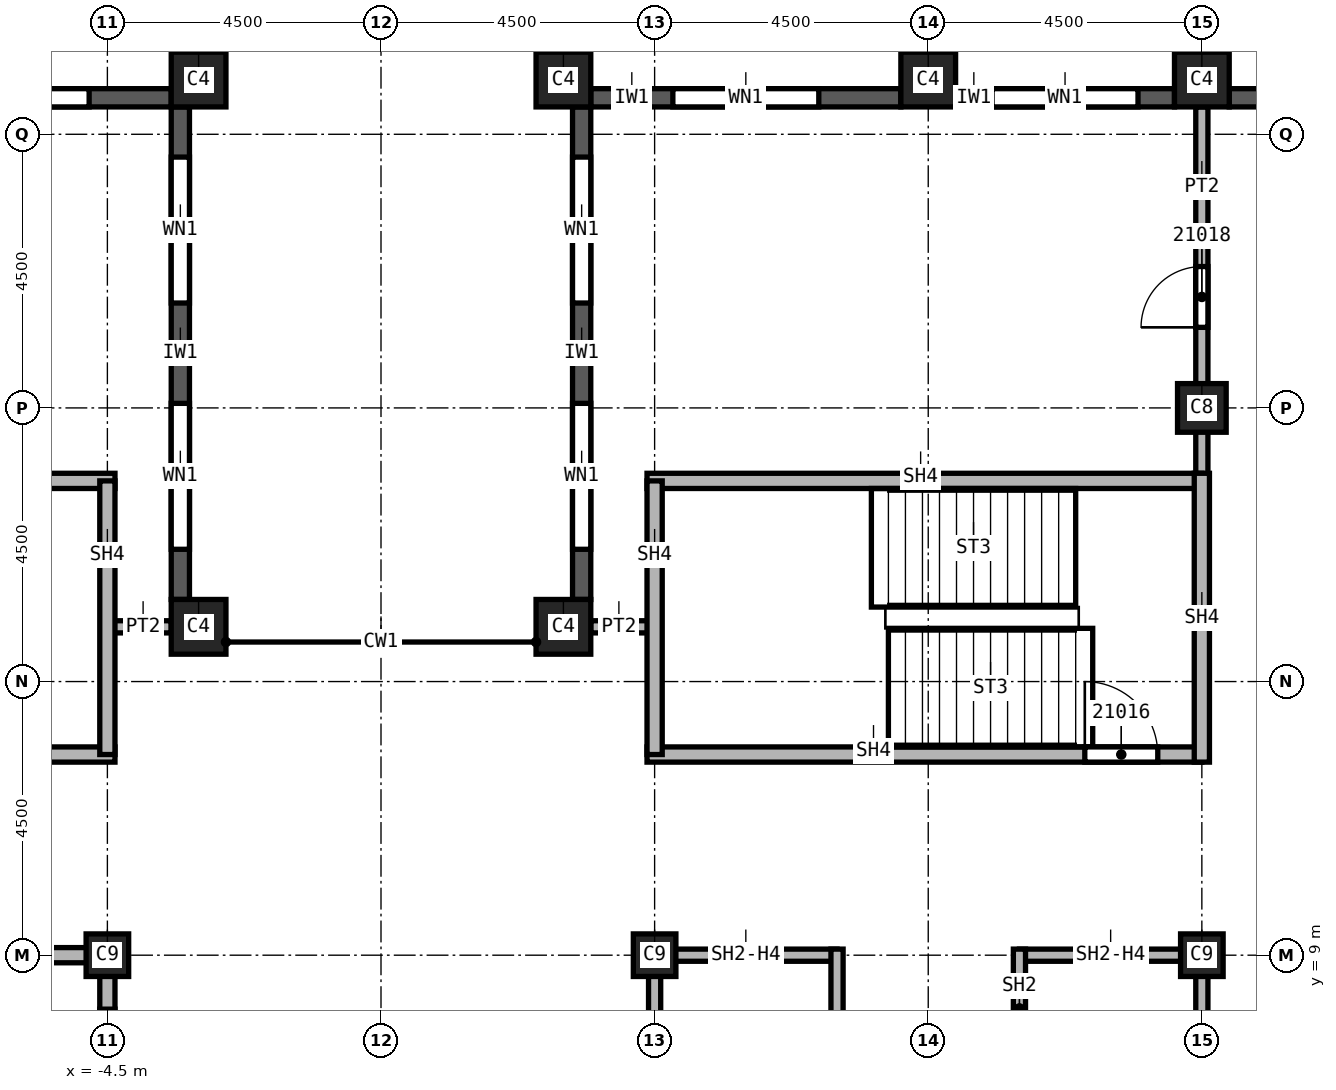
"""IFC4 building model, lengths in metres.
Left out: names, types, materials, properties, quantities, classifications, styles, units other than length and angle.
Written with IfcOpenShell. Run it as: python <this file> out.ifc"""

import sys

from ifc_helpers import new_model, si_unit, direction, frame, frame_2d, origin, origin_2d, place, context, subcontext, project, spatial, rectangle, extrude, element, fill, save


model = new_model("IFC4")
c1 = context("Model", 3, precision=1e-05, world=origin(), true_north=direction((0.0, 1.0)))
c2 = subcontext(c1, "Body", "Model", "MODEL_VIEW")
j1 = project(units=[si_unit("LENGTHUNIT", "METRE"), si_unit("PLANEANGLEUNIT", "RADIAN")], contexts=[c1])
p1 = place(None, origin())
s1 = spatial("IfcSite", under=j1, at=p1, CompositionType="ELEMENT")
p2 = place(p1, origin())
s2 = spatial("IfcBuilding", under=s1, at=p2, CompositionType="ELEMENT")
p3 = place(p2, frame((0.0, 0.0, 304.0)))
s3 = spatial("IfcBuildingStorey", under=s2, at=p3, CompositionType="ELEMENT", Elevation=304.0)
p4 = place(p3, frame((13.5, 18.0, 0.0), z_axis=(0.0, 0.0, 1.0), x_axis=(1.0, 0.0, 0.0)))
e1 = element("IfcColumn", 1, at=p4, inside=s3, PredefinedType="COLUMN", context=c2, shape_type="SweptSolid", body=[
    extrude(rectangle(XDim=0.8, YDim=0.8, at=origin_2d()), origin(), (0.0, 0.0, 1.0), 3.74),
])
for number, where, z_axis, x_axis in (
    (2, (4.5, 9.0, 0.0), (0.0, 0.0, 1.0), (1.0, 0.0, 0.0)),
    (3, (13.5, 9.0, 0.0), (0.0, 0.0, 1.0), (1.0, 0.0, 0.0)),
    (4, (-4.5, 9.0, 0.0), (0.0, 0.0, 1.0), (1.0, 0.0, 0.0)),
):
    element("IfcColumn", number, at=place(p3, frame(where, z_axis=z_axis, x_axis=x_axis)), inside=s3, PredefinedType="COLUMN", context=c2, shape_type="SweptSolid", body=[
        extrude(rectangle(XDim=0.7, YDim=0.7, at=origin_2d()), origin(), (0.0, 0.0, 1.0), 3.74),
    ])
for number, where, z_axis, x_axis in (
    (5, (3.0, 23.4, 0.0), (0.0, 0.0, 1.0), (1.0, 0.0, 0.0)),
    (6, (9.0, 23.4, 0.0), (0.0, 0.0, 1.0), (1.0, 0.0, 0.0)),
    (7, (13.5, 23.4, 0.0), (0.0, 0.0, 1.0), (1.0, 0.0, 0.0)),
    (8, (-3.0, 23.4, 0.0), (0.0, 0.0, 1.0), (1.0, 0.0, 0.0)),
    (9, (3.0, 14.4, 0.0), (0.0, 0.0, 1.0), (1.0, 0.0, 0.0)),
    (10, (-3.0, 14.4, 0.0), (0.0, 0.0, 1.0), (1.0, 0.0, 0.0)),
):
    element("IfcColumn", number, at=place(p3, frame(where, z_axis=z_axis, x_axis=x_axis)), inside=s3, PredefinedType="COLUMN", context=c2, shape_type="SweptSolid", body=[
        extrude(rectangle(XDim=0.9, YDim=0.9, at=origin_2d()), origin(), (0.0, 0.0, 1.0), 3.74),
    ])
p5 = place(p3, frame((17.55, 23.1, 0.0), z_axis=(0.0, 0.0, 1.0), x_axis=(-1.0, 0.0, 0.0)))
e11 = element("IfcWall", 11, at=p5, inside=s3, PredefinedType="SOLIDWALL", context=c2, shape_type="SweptSolid", body=[
    extrude(rectangle(XDim=3.6, YDim=0.3, at=frame_2d((1.8, 0.0))), origin(), (0.0, 0.0, 1.0), 3.14),
])
p6 = place(p5, frame((0.775, 0.0, 0.8)))
e12 = element("IfcOpeningElement", 12, at=p6, cuts=e11, PredefinedType="OPENING", context=c2, shape_type="SweptSolid", body=[
    extrude(rectangle(XDim=1.0, YDim=1.95, at=frame_2d((0.5, 0.975))), frame((0.0, 0.15, 0.0), z_axis=(0.0, -1.0, 0.0), x_axis=(1.0, 0.0, 0.0)), (0.0, 0.0, 1.0), 0.3),
])
p7 = place(p5, frame((2.375, 0.0, 0.8)))
e13 = element("IfcOpeningElement", 13, at=p7, cuts=e11, PredefinedType="OPENING", context=c2, shape_type="SweptSolid", body=[
    extrude(rectangle(XDim=0.6, YDim=1.95, at=frame_2d((0.3, 0.975))), frame((0.0, 0.15, 0.0), z_axis=(0.0, -1.0, 0.0), x_axis=(1.0, 0.0, 0.0)), (0.0, 0.0, 1.0), 0.3),
])
p8 = place(p3, frame((13.05, 23.1, 0.0), z_axis=(0.0, 0.0, 1.0), x_axis=(-1.0, 0.0, 0.0)))
e14 = element("IfcWall", 14, at=p8, inside=s3, PredefinedType="SOLIDWALL", context=c2, shape_type="SweptSolid", body=[
    extrude(rectangle(XDim=3.6, YDim=0.3, at=frame_2d((1.8, 0.0))), origin(), (0.0, 0.0, 1.0), 3.14),
])
p9 = place(p8, frame((0.6, 0.0, 0.8)))
e15 = element("IfcOpeningElement", 15, at=p9, cuts=e14, PredefinedType="OPENING", context=c2, shape_type="SweptSolid", body=[
    extrude(rectangle(XDim=2.4, YDim=1.95, at=frame_2d((1.2, 0.975))), frame((0.0, 0.15, 0.0), z_axis=(0.0, -1.0, 0.0), x_axis=(1.0, 0.0, 0.0)), (0.0, 0.0, 1.0), 0.3),
])
p10 = place(p3, frame((8.55, 23.1, 0.0), z_axis=(0.0, 0.0, 1.0), x_axis=(-1.0, 0.0, 0.0)))
e16 = element("IfcWall", 16, at=p10, inside=s3, PredefinedType="SOLIDWALL", context=c2, shape_type="SweptSolid", body=[
    extrude(rectangle(XDim=5.1, YDim=0.3, at=frame_2d((2.55, 0.0))), origin(), (0.0, 0.0, 1.0), 3.14),
])
p11 = place(p10, frame((1.35, 0.0, 0.8)))
e17 = element("IfcOpeningElement", 17, at=p11, cuts=e16, PredefinedType="OPENING", context=c2, shape_type="SweptSolid", body=[
    extrude(rectangle(XDim=2.4, YDim=1.95, at=frame_2d((1.2, 0.975))), frame((0.0, 0.15, 0.0), z_axis=(0.0, -1.0, 0.0), x_axis=(1.0, 0.0, 0.0)), (0.0, 0.0, 1.0), 0.3),
])
p12 = place(p3, frame((3.3, 22.95, 0.0), z_axis=(0.0, 0.0, 1.0), x_axis=(0.0, -1.0, 0.0)))
e18 = element("IfcWall", 18, at=p12, inside=s3, PredefinedType="SOLIDWALL", context=c2, shape_type="SweptSolid", body=[
    extrude(rectangle(XDim=8.1, YDim=0.3, at=frame_2d((4.05, 0.0))), origin(), (0.0, 0.0, 1.0), 3.14),
])
p13 = place(p12, frame((0.825, 0.0, 0.8)))
e19 = element("IfcOpeningElement", 19, at=p13, cuts=e18, PredefinedType="OPENING", context=c2, shape_type="SweptSolid", body=[
    extrude(rectangle(XDim=2.4, YDim=1.95, at=frame_2d((1.2, 0.975))), frame((0.0, 0.15, 0.0), z_axis=(0.0, -1.0, 0.0), x_axis=(1.0, 0.0, 0.0)), (0.0, 0.0, 1.0), 0.3),
])
p14 = place(p12, frame((4.875, 0.0, 0.8)))
e20 = element("IfcOpeningElement", 20, at=p14, cuts=e18, PredefinedType="OPENING", context=c2, shape_type="SweptSolid", body=[
    extrude(rectangle(XDim=2.4, YDim=1.95, at=frame_2d((1.2, 0.975))), frame((0.0, 0.15, 0.0), z_axis=(0.0, -1.0, 0.0), x_axis=(1.0, 0.0, 0.0)), (0.0, 0.0, 1.0), 0.3),
])
p15 = place(p3, frame((-3.3, 14.85, 0.0), z_axis=(0.0, 0.0, 1.0), x_axis=(0.0, 1.0, 0.0)))
e21 = element("IfcWall", 21, at=p15, inside=s3, PredefinedType="SOLIDWALL", context=c2, shape_type="SweptSolid", body=[
    extrude(rectangle(XDim=8.1, YDim=0.3, at=frame_2d((4.05, 0.0))), origin(), (0.0, 0.0, 1.0), 3.14),
])
p16 = place(p15, frame((0.825, 0.0, 0.8)))
e22 = element("IfcOpeningElement", 22, at=p16, cuts=e21, PredefinedType="OPENING", context=c2, shape_type="SweptSolid", body=[
    extrude(rectangle(XDim=2.4, YDim=1.95, at=frame_2d((1.2, 0.975))), frame((0.0, 0.15, 0.0), z_axis=(0.0, -1.0, 0.0), x_axis=(1.0, 0.0, 0.0)), (0.0, 0.0, 1.0), 0.3),
])
p17 = place(p15, frame((4.875, 0.0, 0.8)))
e23 = element("IfcOpeningElement", 23, at=p17, cuts=e21, PredefinedType="OPENING", context=c2, shape_type="SweptSolid", body=[
    extrude(rectangle(XDim=2.4, YDim=1.95, at=frame_2d((1.2, 0.975))), frame((0.0, 0.15, 0.0), z_axis=(0.0, -1.0, 0.0), x_axis=(1.0, 0.0, 0.0)), (0.0, 0.0, 1.0), 0.3),
])
p18 = place(p3, frame((-3.45, 23.1, 0.0), z_axis=(0.0, 0.0, 1.0), x_axis=(-1.0, 0.0, 0.0)))
e24 = element("IfcWall", 24, at=p18, inside=s3, PredefinedType="SOLIDWALL", context=c2, shape_type="SweptSolid", body=[
    extrude(rectangle(XDim=5.1, YDim=0.3, at=frame_2d((2.55, 0.0))), origin(), (0.0, 0.0, 1.0), 3.14),
])
p19 = place(p18, frame((1.35, 0.0, 0.8)))
e25 = element("IfcOpeningElement", 25, at=p19, cuts=e24, PredefinedType="OPENING", context=c2, shape_type="SweptSolid", body=[
    extrude(rectangle(XDim=2.4, YDim=1.95, at=frame_2d((1.2, 0.975))), frame((0.0, 0.15, 0.0), z_axis=(0.0, -1.0, 0.0), x_axis=(1.0, 0.0, 0.0)), (0.0, 0.0, 1.0), 0.3),
])
for number, where, z_axis, x_axis in (
    (26, (-4.5, 14.4, 0.0), (0.0, 0.0, 1.0), (1.0, 0.0, 0.0)),
    (27, (3.45, 14.4, 0.0), (0.0, 0.0, 1.0), (1.0, 0.0, 0.0)),
):
    element("IfcWall", number, at=place(p3, frame(where, z_axis=z_axis, x_axis=x_axis)), inside=s3, PredefinedType="PARTITIONING", context=c2, shape_type="SweptSolid", body=[
        extrude(rectangle(XDim=1.05, YDim=0.2, at=frame_2d((0.525, 0.0))), origin(), (0.0, 0.0, 1.0), 3.74),
    ])
p20 = place(p3, frame((13.5, 16.675, 0.0), z_axis=(0.0, 0.0, 1.0), x_axis=(0.0, 1.0, 0.0)))
e28 = element("IfcWall", 28, at=p20, inside=s3, PredefinedType="PARTITIONING", context=c2, shape_type="SweptSolid", body=[
    extrude(rectangle(XDim=6.275, YDim=0.2, at=frame_2d((3.137, 0.0))), origin(), (0.0, 0.0, 1.0), 3.74),
])
p21 = place(p20, frame((2.65, 0.0, 0.0)))
e29 = element("IfcOpeningElement", 29, at=p21, cuts=e28, PredefinedType="OPENING", context=c2, shape_type="SweptSolid", body=[
    extrude(rectangle(XDim=1.0, YDim=2.1, at=frame_2d((0.5, 1.05))), frame((0.0, 0.1, 0.0), z_axis=(0.0, -1.0, 0.0), x_axis=(1.0, 0.0, 0.0)), (0.0, 0.0, 1.0), 0.2),
])
p22 = place(p3, frame((4.5, -6.0, 0.0), z_axis=(0.0, 0.0, 1.0), x_axis=(0.0, 1.0, 0.0)))
e30 = element("IfcWall", 30, at=p22, inside=s3, PredefinedType="SOLIDWALL", context=c2, shape_type="SweptSolid", body=[
    extrude(rectangle(XDim=15.1, YDim=0.2, at=frame_2d((7.55, 0.0))), origin(), (0.0, 0.0, 1.0), 3.062),
])
p23 = place(p22, frame((4.0, 0.0, 0.0)))
e31 = element("IfcOpeningElement", 31, at=p23, cuts=e30, PredefinedType="OPENING", context=c2, shape_type="SweptSolid", body=[
    extrude(rectangle(XDim=1.1, YDim=2.1, at=frame_2d((0.55, 1.05))), frame((0.0, 0.1, 0.0), z_axis=(0.0, -1.0, 0.0), x_axis=(1.0, 0.0, 0.0)), (0.0, 0.0, 1.0), 0.2),
])
p24 = place(p22, frame((12.25, 0.0, 0.0)))
e32 = element("IfcOpeningElement", 32, at=p24, cuts=e30, PredefinedType="OPENING", context=c2, shape_type="SweptSolid", body=[
    extrude(rectangle(XDim=1.1, YDim=2.1, at=frame_2d((0.55, 1.05))), frame((0.0, 0.1, 0.0), z_axis=(0.0, -1.0, 0.0), x_axis=(1.0, 0.0, 0.0)), (0.0, 0.0, 1.0), 0.2),
])
p25 = place(p3, frame((4.5, 9.0, 0.0), z_axis=(0.0, 0.0, 1.0), x_axis=(1.0, 0.0, 0.0)))
e33 = element("IfcWall", 33, at=p25, inside=s3, PredefinedType="SOLIDWALL", context=c2, shape_type="SweptSolid", body=[
    extrude(rectangle(XDim=3.0, YDim=0.2, at=frame_2d((1.5, 0.0))), origin(), (0.0, 0.0, 1.0), 3.062),
])
p26 = place(p3, frame((7.5, 9.1, 0.0), z_axis=(0.0, 0.0, 1.0), x_axis=(0.0, -1.0, 0.0)))
e34 = element("IfcWall", 34, at=p26, inside=s3, PredefinedType="SOLIDWALL", context=c2, shape_type="SweptSolid", body=[
    extrude(rectangle(XDim=6.225, YDim=0.2, at=frame_2d((3.113, 0.0))), origin(), (0.0, 0.0, 1.0), 3.74),
])
p27 = place(p3, frame((10.5, 9.0, 0.0), z_axis=(0.0, 0.0, 1.0), x_axis=(1.0, 0.0, 0.0)))
e35 = element("IfcWall", 35, at=p27, inside=s3, PredefinedType="SOLIDWALL", context=c2, shape_type="SweptSolid", body=[
    extrude(rectangle(XDim=3.0, YDim=0.2, at=frame_2d((1.5, 0.0))), origin(), (0.0, 0.0, 1.0), 3.062),
])
p28 = place(p3, frame((10.5, 9.1, 0.0), z_axis=(0.0, 0.0, 1.0), x_axis=(0.0, -1.0, 0.0)))
e36 = element("IfcWall", 36, at=p28, inside=s3, PredefinedType="SOLIDWALL", context=c2, shape_type="SweptSolid", body=[
    extrude(rectangle(XDim=3.225, YDim=0.2, at=frame_2d((1.613, 0.0))), origin(), (0.0, 0.0, 1.0), 3.74),
])
p29 = place(p28, frame((1.75, 0.0, 0.0)))
e37 = element("IfcOpeningElement", 37, at=p29, cuts=e36, PredefinedType="OPENING", context=c2, shape_type="SweptSolid", body=[
    extrude(rectangle(XDim=1.1, YDim=2.1, at=frame_2d((0.55, 1.05))), frame((0.0, 0.1, 0.0), z_axis=(0.0, -1.0, 0.0), x_axis=(1.0, 0.0, 0.0)), (0.0, 0.0, 1.0), 0.2),
])
p30 = place(p3, frame((13.5, 9.1, 0.0), z_axis=(0.0, 0.0, 1.0), x_axis=(0.0, -1.0, 0.0)))
e38 = element("IfcWall", 38, at=p30, inside=s3, PredefinedType="SOLIDWALL", context=c2, shape_type="SweptSolid", body=[
    extrude(rectangle(XDim=3.1, YDim=0.2, at=frame_2d((1.55, 0.0))), origin(), (0.0, 0.0, 1.0), 3.062),
])
p31 = place(p3, frame((-7.5, 9.0, 0.0), z_axis=(0.0, 0.0, 1.0), x_axis=(1.0, 0.0, 0.0)))
e39 = element("IfcWall", 39, at=p31, inside=s3, PredefinedType="SOLIDWALL", context=c2, shape_type="SweptSolid", body=[
    extrude(rectangle(XDim=3.0, YDim=0.25, at=frame_2d((1.5, 0.0))), origin(), (0.0, 0.0, 1.0), 3.062),
])
p32 = place(p3, frame((-4.5, 9.125, 0.0), z_axis=(0.0, 0.0, 1.0), x_axis=(0.0, -1.0, 0.0)))
e40 = element("IfcWall", 40, at=p32, inside=s3, PredefinedType="SOLIDWALL", context=c2, shape_type="SweptSolid", body=[
    extrude(rectangle(XDim=3.125, YDim=0.25, at=frame_2d((1.562, 0.0))), origin(), (0.0, 0.0, 1.0), 3.062),
])
p33 = place(p32, frame((1.012, 0.0, 0.0)))
e41 = element("IfcOpeningElement", 41, at=p33, cuts=e40, PredefinedType="OPENING", context=c2, shape_type="SweptSolid", body=[
    extrude(rectangle(XDim=1.1, YDim=2.1, at=frame_2d((0.55, 1.05))), frame((0.0, 0.125, 0.0), z_axis=(0.0, -1.0, 0.0), x_axis=(1.0, 0.0, 0.0)), (0.0, 0.0, 1.0), 0.25),
])
p34 = place(p3, frame((-13.5, 12.3, 0.0), z_axis=(0.0, 0.0, 1.0), x_axis=(1.0, 0.0, 0.0)))
e42 = element("IfcWall", 42, at=p34, inside=s3, PredefinedType="SOLIDWALL", context=c2, shape_type="SweptSolid", body=[
    extrude(rectangle(XDim=9.125, YDim=0.25, at=frame_2d((4.562, 0.0))), origin(), (0.0, 0.0, 1.0), 3.74),
])
p35 = place(p34, frame((0.6, 0.0, 0.0)))
e43 = element("IfcOpeningElement", 43, at=p35, cuts=e42, PredefinedType="OPENING", context=c2, shape_type="SweptSolid", body=[
    extrude(rectangle(XDim=1.2, YDim=2.1, at=frame_2d((0.6, 1.05))), frame((0.0, 0.125, 0.0), z_axis=(0.0, -1.0, 0.0), x_axis=(1.0, 0.0, 0.0)), (0.0, 0.0, 1.0), 0.25),
])
p36 = place(p3, frame((-13.5, 16.8, 0.0), z_axis=(0.0, 0.0, 1.0), x_axis=(1.0, 0.0, 0.0)))
e44 = element("IfcWall", 44, at=p36, inside=s3, PredefinedType="SOLIDWALL", context=c2, shape_type="SweptSolid", body=[
    extrude(rectangle(XDim=9.125, YDim=0.25, at=frame_2d((4.562, 0.0))), origin(), (0.0, 0.0, 1.0), 3.74),
])
p37 = place(p3, frame((-4.5, 16.8, 0.0), z_axis=(0.0, 0.0, 1.0), x_axis=(0.0, -1.0, 0.0)))
e45 = element("IfcWall", 45, at=p37, inside=s3, PredefinedType="SOLIDWALL", context=c2, shape_type="SweptSolid", body=[
    extrude(rectangle(XDim=4.5, YDim=0.25, at=frame_2d((2.25, 0.0))), origin(), (0.0, 0.0, 1.0), 3.74),
])
p38 = place(p3, frame((4.375, 12.3, 0.0), z_axis=(0.0, 0.0, 1.0), x_axis=(1.0, 0.0, 0.0)))
e46 = element("IfcWall", 46, at=p38, inside=s3, PredefinedType="SOLIDWALL", context=c2, shape_type="SweptSolid", body=[
    extrude(rectangle(XDim=9.125, YDim=0.25, at=frame_2d((4.562, 0.0))), origin(), (0.0, 0.0, 1.0), 3.74),
])
p39 = place(p38, frame((7.2, 0.0, 0.0)))
e47 = element("IfcOpeningElement", 47, at=p39, cuts=e46, PredefinedType="OPENING", context=c2, shape_type="SweptSolid", body=[
    extrude(rectangle(XDim=1.2, YDim=2.1, at=frame_2d((0.6, 1.05))), frame((0.0, 0.125, 0.0), z_axis=(0.0, -1.0, 0.0), x_axis=(1.0, 0.0, 0.0)), (0.0, 0.0, 1.0), 0.25),
])
p40 = place(p3, frame((4.375, 16.8, 0.0), z_axis=(0.0, 0.0, 1.0), x_axis=(1.0, 0.0, 0.0)))
e48 = element("IfcWall", 48, at=p40, inside=s3, PredefinedType="SOLIDWALL", context=c2, shape_type="SweptSolid", body=[
    extrude(rectangle(XDim=9.125, YDim=0.25, at=frame_2d((4.562, 0.0))), origin(), (0.0, 0.0, 1.0), 3.74),
])
p41 = place(p3, frame((4.5, 12.3, 0.0), z_axis=(0.0, 0.0, 1.0), x_axis=(0.0, 1.0, 0.0)))
e49 = element("IfcWall", 49, at=p41, inside=s3, PredefinedType="SOLIDWALL", context=c2, shape_type="SweptSolid", body=[
    extrude(rectangle(XDim=4.5, YDim=0.25, at=frame_2d((2.25, 0.0))), origin(), (0.0, 0.0, 1.0), 3.74),
])
p42 = place(p3, frame((13.5, 12.175, 0.0), z_axis=(0.0, 0.0, 1.0), x_axis=(0.0, 1.0, 0.0)))
e50 = element("IfcWall", 50, at=p42, inside=s3, PredefinedType="SOLIDWALL", context=c2, shape_type="SweptSolid", body=[
    extrude(rectangle(XDim=4.75, YDim=0.25, at=frame_2d((2.375, 0.0))), origin(), (0.0, 0.0, 1.0), 3.74),
])
p43 = place(p9, origin())
e51 = element("IfcWindow", 51, at=p43, inside=s3, PartitioningType="SINGLE_PANEL", PredefinedType="WINDOW", context=c2, shape_type="SweptSolid", body=[
    extrude(rectangle(XDim=2.4, YDim=1.95, at=frame_2d((1.2, 0.975))), frame((0.0, 0.03, 0.0), z_axis=(0.0, -1.0, 0.0), x_axis=(1.0, 0.0, 0.0)), (0.0, 0.0, 1.0), 0.06),
])
fill(e15, e51)
p44 = place(p11, origin())
e52 = element("IfcWindow", 52, at=p44, inside=s3, PartitioningType="SINGLE_PANEL", PredefinedType="WINDOW", context=c2, shape_type="SweptSolid", body=[
    extrude(rectangle(XDim=2.4, YDim=1.95, at=frame_2d((1.2, 0.975))), frame((0.0, 0.03, 0.0), z_axis=(0.0, -1.0, 0.0), x_axis=(1.0, 0.0, 0.0)), (0.0, 0.0, 1.0), 0.06),
])
fill(e17, e52)
p45 = place(p13, origin())
e53 = element("IfcWindow", 53, at=p45, inside=s3, PartitioningType="SINGLE_PANEL", PredefinedType="WINDOW", context=c2, shape_type="SweptSolid", body=[
    extrude(rectangle(XDim=2.4, YDim=1.95, at=frame_2d((1.2, 0.975))), frame((0.0, 0.03, 0.0), z_axis=(0.0, -1.0, 0.0), x_axis=(1.0, 0.0, 0.0)), (0.0, 0.0, 1.0), 0.06),
])
fill(e19, e53)
p46 = place(p14, origin())
e54 = element("IfcWindow", 54, at=p46, inside=s3, PartitioningType="SINGLE_PANEL", PredefinedType="WINDOW", context=c2, shape_type="SweptSolid", body=[
    extrude(rectangle(XDim=2.4, YDim=1.95, at=frame_2d((1.2, 0.975))), frame((0.0, 0.03, 0.0), z_axis=(0.0, -1.0, 0.0), x_axis=(1.0, 0.0, 0.0)), (0.0, 0.0, 1.0), 0.06),
])
fill(e20, e54)
p47 = place(p16, origin())
e55 = element("IfcWindow", 55, at=p47, inside=s3, PartitioningType="SINGLE_PANEL", PredefinedType="WINDOW", context=c2, shape_type="SweptSolid", body=[
    extrude(rectangle(XDim=2.4, YDim=1.95, at=frame_2d((1.2, 0.975))), frame((0.0, 0.03, 0.0), z_axis=(0.0, -1.0, 0.0), x_axis=(1.0, 0.0, 0.0)), (0.0, 0.0, 1.0), 0.06),
])
fill(e22, e55)
p48 = place(p17, origin())
e56 = element("IfcWindow", 56, at=p48, inside=s3, PartitioningType="SINGLE_PANEL", PredefinedType="WINDOW", context=c2, shape_type="SweptSolid", body=[
    extrude(rectangle(XDim=2.4, YDim=1.95, at=frame_2d((1.2, 0.975))), frame((0.0, 0.03, 0.0), z_axis=(0.0, -1.0, 0.0), x_axis=(1.0, 0.0, 0.0)), (0.0, 0.0, 1.0), 0.06),
])
fill(e23, e56)
p49 = place(p19, origin())
e57 = element("IfcWindow", 57, at=p49, inside=s3, PartitioningType="SINGLE_PANEL", PredefinedType="WINDOW", context=c2, shape_type="SweptSolid", body=[
    extrude(rectangle(XDim=2.4, YDim=1.95, at=frame_2d((1.2, 0.975))), frame((0.0, 0.03, 0.0), z_axis=(0.0, -1.0, 0.0), x_axis=(1.0, 0.0, 0.0)), (0.0, 0.0, 1.0), 0.06),
])
fill(e25, e57)
p50 = place(p39, origin())
e58 = element("IfcDoor", 58, at=p50, inside=s3, OperationType="SINGLE_SWING_LEFT", PredefinedType="DOOR", context=c2, shape_type="SweptSolid", body=[
    extrude(rectangle(XDim=1.2, YDim=2.1, at=frame_2d((0.6, 1.05))), frame((0.0, 0.025, 0.0), z_axis=(0.0, -1.0, 0.0), x_axis=(1.0, 0.0, 0.0)), (0.0, 0.0, 1.0), 0.05),
])
fill(e47, e58)
p51 = place(p21, origin())
e59 = element("IfcDoor", 59, at=p51, inside=s3, OperationType="SINGLE_SWING_LEFT", PredefinedType="DOOR", context=c2, shape_type="SweptSolid", body=[
    extrude(rectangle(XDim=1.0, YDim=2.1, at=frame_2d((0.5, 1.05))), frame((0.0, 0.025, 0.0), z_axis=(0.0, -1.0, 0.0), x_axis=(1.0, 0.0, 0.0)), (0.0, 0.0, 1.0), 0.05),
])
fill(e29, e59)
p52 = place(p33, origin())
e60 = element("IfcDoor", 60, at=p52, inside=s3, OperationType="SLIDING_TO_LEFT", PredefinedType="DOOR", context=c2, shape_type="SweptSolid", body=[
    extrude(rectangle(XDim=1.1, YDim=2.1, at=frame_2d((0.55, 1.05))), frame((0.0, 0.025, 0.0), z_axis=(0.0, -1.0, 0.0), x_axis=(1.0, 0.0, 0.0)), (0.0, 0.0, 1.0), 0.05),
])
fill(e41, e60)
save(model, sys.argv[1])
